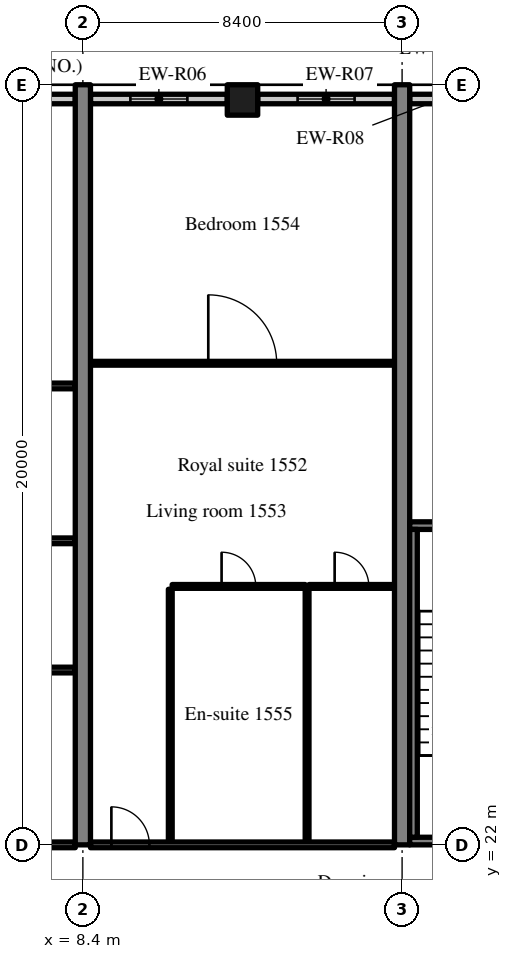
"""IFC4 building model, lengths in metres.
Left out: names, types, materials, properties, quantities, classifications, styles, units other than length and angle.
Written with IfcOpenShell. Run it as: python <this file> out.ifc"""

import sys

from ifc_helpers import new_model, si_unit, direction, frame, frame_2d, origin, origin_2d, place, context, subcontext, project, spatial, rectangle, extrude, source, transform, mapped, element, fill, save


model = new_model("IFC4")
c1 = context("Model", 3, precision=1e-05, world=origin(), true_north=direction((0.0, 1.0)))
c2 = subcontext(c1, "Body", "Model", "MODEL_VIEW")
j1 = project(units=[si_unit("LENGTHUNIT", "METRE"), si_unit("PLANEANGLEUNIT", "RADIAN")], contexts=[c1])
p1 = place(None, origin())
s1 = spatial("IfcSite", under=j1, at=p1, CompositionType="ELEMENT")
p2 = place(p1, origin())
s2 = spatial("IfcBuilding", under=s1, at=p2, CompositionType="ELEMENT")
p3 = place(p2, frame((0.0, 0.0, 65.8)))
s3 = spatial("IfcBuildingStorey", under=s2, at=p3, CompositionType="ELEMENT", Elevation=65.8)
m1 = source(origin(), c2, "Body", "SweptSolid", [
    extrude(rectangle(XDim=20.0, YDim=0.4, at=frame_2d((10.0, 0.0))), origin(), (0.0, 0.0, 1.0), 3.52),
])
for number, where, z_axis, x_axis in (
    (1, (8.4, 22.0, 0.0), (0.0, 0.0, 1.0), (0.0, 1.0, 0.0)),
    (2, (16.8, 22.0, 0.0), (0.0, 0.0, 1.0), (0.0, 1.0, 0.0)),
):
    element("IfcWall", number, at=place(p3, frame(where, z_axis=z_axis, x_axis=x_axis)), inside=s3, PredefinedType="SHEAR", context=c2, shape_type="MappedRepresentation", body=[
        mapped(m1, transform((0.0, 0.0, 0.0), scale=1.0)),
    ])
m2 = source(origin(), c2, "Body", "SweptSolid", [
    extrude(rectangle(XDim=0.8, YDim=0.8, at=origin_2d()), origin(), (0.0, 0.0, 1.0), 3.52),
])
p4 = place(p3, frame((12.6, 41.6, 0.0), z_axis=(0.0, 0.0, 1.0), x_axis=(1.0, 0.0, 0.0)))
e3 = element("IfcColumn", 3, at=p4, inside=s3, PredefinedType="COLUMN", context=c2, shape_type="MappedRepresentation", body=[
    mapped(m2, transform((0.0, 0.0, 0.0), scale=1.0)),
])
m3 = source(origin(), c2, "Body", "SweptSolid", [
    extrude(rectangle(XDim=4.045, YDim=0.25, at=frame_2d((2.022, 0.0))), origin(), (0.0, 0.0, 1.0), 2.82),
])
p5 = place(p3, frame((8.2, 41.625, 0.0), z_axis=(0.0, 0.0, 1.0), x_axis=(-1.0, 0.0, 0.0)))
e4 = element("IfcWall", 4, at=p5, inside=s3, PredefinedType="SOLIDWALL", context=c2, shape_type="MappedRepresentation", body=[
    mapped(m3, transform((0.0, 0.0, 0.0), scale=1.0)),
])
m4 = source(origin(), c2, "Body", "SweptSolid", [
    extrude(rectangle(XDim=1.5, YDim=1.5, at=frame_2d((0.75, 0.75))), frame((0.0, 0.135, 0.0), z_axis=(0.0, -1.0, 0.0), x_axis=(1.0, 0.0, 0.0)), (0.0, 0.0, 1.0), 0.27),
])
p6 = place(p5, frame((1.272, 0.0, 0.9)))
e5 = element("IfcOpeningElement", 5, at=p6, cuts=e4, PredefinedType="OPENING", context=c2, shape_type="MappedRepresentation", body=[
    mapped(m4, transform((0.0, 0.0, 0.0), scale=1.0)),
])
m5 = source(origin(), c2, "Body", "SweptSolid", [
    extrude(rectangle(XDim=3.6, YDim=0.25, at=frame_2d((1.8, 0.0))), origin(), (0.0, 0.0, 1.0), 2.82),
])
p7 = place(p3, frame((12.2, 41.625, 0.0), z_axis=(0.0, 0.0, 1.0), x_axis=(-1.0, 0.0, 0.0)))
e6 = element("IfcWall", 6, at=p7, inside=s3, PredefinedType="SOLIDWALL", context=c2, shape_type="MappedRepresentation", body=[
    mapped(m5, transform((0.0, 0.0, 0.0), scale=1.0)),
])
p8 = place(p7, frame((1.05, 0.0, 0.9)))
e7 = element("IfcOpeningElement", 7, at=p8, cuts=e6, PredefinedType="OPENING", context=c2, shape_type="MappedRepresentation", body=[
    mapped(m4, transform((0.0, 0.0, 0.0), scale=1.0)),
])
m6 = source(origin(), c2, "Body", "SweptSolid", [
    extrude(rectangle(XDim=3.6, YDim=0.25, at=frame_2d((1.8, 0.0))), origin(), (0.0, 0.0, 1.0), 2.82),
])
p9 = place(p3, frame((16.6, 41.625, 0.0), z_axis=(0.0, 0.0, 1.0), x_axis=(-1.0, 0.0, 0.0)))
e8 = element("IfcWall", 8, at=p9, inside=s3, PredefinedType="SOLIDWALL", context=c2, shape_type="MappedRepresentation", body=[
    mapped(m6, transform((0.0, 0.0, 0.0), scale=1.0)),
])
p10 = place(p9, frame((1.05, 0.0, 0.9)))
e9 = element("IfcOpeningElement", 9, at=p10, cuts=e8, PredefinedType="OPENING", context=c2, shape_type="MappedRepresentation", body=[
    mapped(m4, transform((0.0, 0.0, 0.0), scale=1.0)),
])
m7 = source(origin(), c2, "Body", "SweptSolid", [
    extrude(rectangle(XDim=1.658, YDim=0.25, at=frame_2d((0.829, 0.0))), origin(), (0.0, 0.0, 1.0), 2.82),
])
p11 = place(p3, frame((18.658, 41.625, 0.0), z_axis=(0.0, 0.0, 1.0), x_axis=(-1.0, 0.0, 0.0)))
e10 = element("IfcWall", 10, at=p11, inside=s3, PredefinedType="SOLIDWALL", context=c2, shape_type="MappedRepresentation", body=[
    mapped(m7, transform((0.0, 0.0, 0.0), scale=1.0)),
])
m8 = source(origin(), c2, "Body", "SweptSolid", [
    extrude(rectangle(XDim=8.2, YDim=0.2, at=frame_2d((4.1, 0.0))), origin(), (0.0, 0.0, 1.0), 3.52),
])
p12 = place(p3, frame((17.0, 22.1, 0.0), z_axis=(0.0, 0.0, 1.0), x_axis=(1.0, 0.0, 0.0)))
e11 = element("IfcWall", 11, at=p12, inside=s3, PredefinedType="SOLIDWALL", context=c2, shape_type="MappedRepresentation", body=[
    mapped(m8, transform((0.0, 0.0, 0.0), scale=1.0)),
])
m9 = source(origin(), c2, "Body", "SweptSolid", [
    extrude(rectangle(XDim=1.2, YDim=2.1, at=frame_2d((0.6, 1.05))), frame((0.0, 0.11, 0.0), z_axis=(0.0, -1.0, 0.0), x_axis=(1.0, 0.0, 0.0)), (0.0, 0.0, 1.0), 0.22),
])
p13 = place(p12, frame((6.0, 0.0, 0.0)))
e12 = element("IfcOpeningElement", 12, at=p13, cuts=e11, PredefinedType="OPENING", context=c2, shape_type="MappedRepresentation", body=[
    mapped(m9, transform((0.0, 0.0, 0.0), scale=1.0)),
])
p14 = place(p3, frame((17.0, 30.4, 0.0), z_axis=(0.0, 0.0, 1.0), x_axis=(1.0, 0.0, 0.0)))
e13 = element("IfcWall", 13, at=p14, inside=s3, PredefinedType="SOLIDWALL", context=c2, shape_type="MappedRepresentation", body=[
    mapped(m8, transform((0.0, 0.0, 0.0), scale=1.0)),
])
m10 = source(origin(), c2, "Body", "SweptSolid", [
    extrude(rectangle(XDim=1.0, YDim=2.1, at=frame_2d((0.5, 1.05))), frame((0.0, 0.11, 0.0), z_axis=(0.0, -1.0, 0.0), x_axis=(1.0, 0.0, 0.0)), (0.0, 0.0, 1.0), 0.22),
])
p15 = place(p14, frame((6.1, 0.0, 0.0)))
e14 = element("IfcOpeningElement", 14, at=p15, cuts=e13, PredefinedType="OPENING", context=c2, shape_type="MappedRepresentation", body=[
    mapped(m10, transform((0.0, 0.0, 0.0), scale=1.0)),
])
m11 = source(origin(), c2, "Body", "SweptSolid", [
    extrude(rectangle(XDim=8.1, YDim=0.2, at=frame_2d((4.05, 0.0))), origin(), (0.0, 0.0, 1.0), 3.52),
])
p16 = place(p3, frame((17.1, 22.2, 0.0), z_axis=(0.0, 0.0, 1.0), x_axis=(0.0, 1.0, 0.0)))
e15 = element("IfcWall", 15, at=p16, inside=s3, PredefinedType="SOLIDWALL", context=c2, shape_type="MappedRepresentation", body=[
    mapped(m11, transform((0.0, 0.0, 0.0), scale=1.0)),
])
m12 = source(origin(), c2, "Body", "SweptSolid", [
    extrude(rectangle(XDim=5.25, YDim=0.15, at=frame_2d((2.625, 0.0))), origin(), (0.0, 0.0, 1.0), 2.82),
])
p17 = place(p3, frame((2.95, 22.0, 0.0), z_axis=(0.0, 0.0, 1.0), x_axis=(1.0, 0.0, 0.0)))
e16 = element("IfcWall", 16, at=p17, inside=s3, PredefinedType="PARTITIONING", context=c2, shape_type="MappedRepresentation", body=[
    mapped(m12, transform((0.0, 0.0, 0.0), scale=1.0)),
])
m13 = source(origin(), c2, "Body", "SweptSolid", [
    extrude(rectangle(XDim=5.25, YDim=0.15, at=frame_2d((2.625, 0.0))), origin(), (0.0, 0.0, 1.0), 3.52),
])
for number, where, z_axis, x_axis in (
    (17, (2.95, 26.6, 0.0), (0.0, 0.0, 1.0), (1.0, 0.0, 0.0)),
    (18, (2.95, 30.0, 0.0), (0.0, 0.0, 1.0), (1.0, 0.0, 0.0)),
):
    element("IfcWall", number, at=place(p3, frame(where, z_axis=z_axis, x_axis=x_axis)), inside=s3, PredefinedType="PARTITIONING", context=c2, shape_type="MappedRepresentation", body=[
        mapped(m13, transform((0.0, 0.0, 0.0), scale=1.0)),
    ])
m14 = source(origin(), c2, "Body", "SweptSolid", [
    extrude(rectangle(XDim=7.8, YDim=0.15, at=frame_2d((3.9, 0.0))), origin(), (0.0, 0.0, 1.0), 3.52),
])
p18 = place(p3, frame((0.4, 34.075, 0.0), z_axis=(0.0, 0.0, 1.0), x_axis=(1.0, 0.0, 0.0)))
e19 = element("IfcWall", 19, at=p18, inside=s3, PredefinedType="PARTITIONING", context=c2, shape_type="MappedRepresentation", body=[
    mapped(m14, transform((0.0, 0.0, 0.0), scale=1.0)),
])
m15 = source(origin(), c2, "Body", "SweptSolid", [
    extrude(rectangle(XDim=1.0, YDim=2.1, at=frame_2d((0.5, 1.05))), frame((0.0, 0.085, 0.0), z_axis=(0.0, -1.0, 0.0), x_axis=(1.0, 0.0, 0.0)), (0.0, 0.0, 1.0), 0.17),
])
p19 = place(p18, frame((0.7, 0.0, 0.0)))
e20 = element("IfcOpeningElement", 20, at=p19, cuts=e19, PredefinedType="OPENING", context=c2, shape_type="MappedRepresentation", body=[
    mapped(m15, transform((0.0, 0.0, 0.0), scale=1.0)),
])
m16 = source(origin(), c2, "Body", "SweptSolid", [
    extrude(rectangle(XDim=6.65, YDim=0.1, at=frame_2d((3.325, 0.0))), origin(), (0.0, 0.0, 1.0), 3.52),
])
for number, where, z_axis, x_axis in (
    (21, (10.7, 22.075, 0.0), (0.0, 0.0, 1.0), (0.0, 1.0, 0.0)),
    (22, (14.3, 22.075, 0.0), (0.0, 0.0, 1.0), (0.0, 1.0, 0.0)),
):
    element("IfcWall", number, at=place(p3, frame(where, z_axis=z_axis, x_axis=x_axis)), inside=s3, PredefinedType="PARTITIONING", context=c2, shape_type="MappedRepresentation", body=[
        mapped(m16, transform((0.0, 0.0, 0.0), scale=1.0)),
    ])
m17 = source(origin(), c2, "Body", "SweptSolid", [
    extrude(rectangle(XDim=3.5, YDim=0.1, at=frame_2d((1.75, 0.0))), origin(), (0.0, 0.0, 1.0), 3.52),
])
p20 = place(p3, frame((10.75, 28.8, 0.0), z_axis=(0.0, 0.0, 1.0), x_axis=(1.0, 0.0, 0.0)))
e23 = element("IfcWall", 23, at=p20, inside=s3, PredefinedType="PARTITIONING", context=c2, shape_type="MappedRepresentation", body=[
    mapped(m17, transform((0.0, 0.0, 0.0), scale=1.0)),
])
m18 = source(origin(), c2, "Body", "SweptSolid", [
    extrude(rectangle(XDim=0.9, YDim=2.1, at=frame_2d((0.45, 1.05))), frame((0.0, 0.06, 0.0), z_axis=(0.0, -1.0, 0.0), x_axis=(1.0, 0.0, 0.0)), (0.0, 0.0, 1.0), 0.12),
])
p21 = place(p20, frame((1.3, 0.0, 0.0)))
e24 = element("IfcOpeningElement", 24, at=p21, cuts=e23, PredefinedType="OPENING", context=c2, shape_type="MappedRepresentation", body=[
    mapped(m18, transform((0.0, 0.0, 0.0), scale=1.0)),
])
m19 = source(origin(), c2, "Body", "SweptSolid", [
    extrude(rectangle(XDim=2.25, YDim=0.1, at=frame_2d((1.125, 0.0))), origin(), (0.0, 0.0, 1.0), 3.52),
])
p22 = place(p3, frame((14.35, 28.8, 0.0), z_axis=(0.0, 0.0, 1.0), x_axis=(1.0, 0.0, 0.0)))
e25 = element("IfcWall", 25, at=p22, inside=s3, PredefinedType="PARTITIONING", context=c2, shape_type="MappedRepresentation", body=[
    mapped(m19, transform((0.0, 0.0, 0.0), scale=1.0)),
])
p23 = place(p22, frame((0.675, 0.0, 0.0)))
e26 = element("IfcOpeningElement", 26, at=p23, cuts=e25, PredefinedType="OPENING", context=c2, shape_type="MappedRepresentation", body=[
    mapped(m18, transform((0.0, 0.0, 0.0), scale=1.0)),
])
m20 = source(origin(), c2, "Body", "SweptSolid", [
    extrude(rectangle(XDim=8.0, YDim=0.1, at=frame_2d((4.0, 0.0))), origin(), (0.0, 0.0, 1.0), 3.52),
])
p24 = place(p3, frame((8.6, 34.672, 0.0), z_axis=(0.0, 0.0, 1.0), x_axis=(1.0, 0.0, 0.0)))
e27 = element("IfcWall", 27, at=p24, inside=s3, PredefinedType="PARTITIONING", context=c2, shape_type="MappedRepresentation", body=[
    mapped(m20, transform((0.0, 0.0, 0.0), scale=1.0)),
])
m21 = source(origin(), c2, "Body", "SweptSolid", [
    extrude(rectangle(XDim=1.8, YDim=2.1, at=frame_2d((0.9, 1.05))), frame((0.0, 0.06, 0.0), z_axis=(0.0, -1.0, 0.0), x_axis=(1.0, 0.0, 0.0)), (0.0, 0.0, 1.0), 0.12),
])
p25 = place(p24, frame((3.1, 0.0, 0.0)))
e28 = element("IfcOpeningElement", 28, at=p25, cuts=e27, PredefinedType="OPENING", context=c2, shape_type="MappedRepresentation", body=[
    mapped(m21, transform((0.0, 0.0, 0.0), scale=1.0)),
])
m22 = source(origin(), c2, "Body", "SweptSolid", [
    extrude(rectangle(XDim=8.0, YDim=0.15, at=frame_2d((4.0, 0.0))), origin(), (0.0, 0.0, 1.0), 2.82),
])
p26 = place(p3, frame((8.6, 22.0, 0.0), z_axis=(0.0, 0.0, 1.0), x_axis=(1.0, 0.0, 0.0)))
e29 = element("IfcWall", 29, at=p26, inside=s3, PredefinedType="PARTITIONING", context=c2, shape_type="MappedRepresentation", body=[
    mapped(m22, transform((0.0, 0.0, 0.0), scale=1.0)),
])
p27 = place(p26, frame((0.55, 0.0, 0.0)))
e30 = element("IfcOpeningElement", 30, at=p27, cuts=e29, PredefinedType="OPENING", context=c2, shape_type="MappedRepresentation", body=[
    mapped(m15, transform((0.0, 0.0, 0.0), scale=1.0)),
])
m23 = source(origin(), c2, "Body", "SweptSolid", [
    extrude(rectangle(XDim=1.5, YDim=1.5, at=frame_2d((0.75, 0.75))), frame((0.0, 0.03, 0.0), z_axis=(0.0, -1.0, 0.0), x_axis=(1.0, 0.0, 0.0)), (0.0, 0.0, 1.0), 0.06),
])
p28 = place(p8, origin())
e31 = element("IfcWindow", 31, at=p28, inside=s3, PartitioningType="SINGLE_PANEL", PredefinedType="WINDOW", context=c2, shape_type="MappedRepresentation", body=[
    mapped(m23, transform((0.0, 0.0, 0.0), scale=1.0)),
])
fill(e7, e31)
p29 = place(p10, origin())
e32 = element("IfcWindow", 32, at=p29, inside=s3, PartitioningType="SINGLE_PANEL", PredefinedType="WINDOW", context=c2, shape_type="MappedRepresentation", body=[
    mapped(m23, transform((0.0, 0.0, 0.0), scale=1.0)),
])
fill(e9, e32)
m24 = source(origin(), c2, "Body", "SweptSolid", [
    extrude(rectangle(XDim=0.9, YDim=2.1, at=frame_2d((0.45, 1.05))), frame((0.0, 0.025, 0.0), z_axis=(0.0, -1.0, 0.0), x_axis=(1.0, 0.0, 0.0)), (0.0, 0.0, 1.0), 0.05),
])
p30 = place(p21, origin())
e33 = element("IfcDoor", 33, at=p30, inside=s3, OperationType="SINGLE_SWING_LEFT", PredefinedType="DOOR", context=c2, shape_type="MappedRepresentation", body=[
    mapped(m24, transform((0.0, 0.0, 0.0), scale=1.0)),
])
fill(e24, e33)
p31 = place(p23, origin())
e34 = element("IfcDoor", 34, at=p31, inside=s3, OperationType="SINGLE_SWING_LEFT", PredefinedType="DOOR", context=c2, shape_type="MappedRepresentation", body=[
    mapped(m24, transform((0.0, 0.0, 0.0), scale=1.0)),
])
fill(e26, e34)
m25 = source(origin(), c2, "Body", "SweptSolid", [
    extrude(rectangle(XDim=1.8, YDim=2.1, at=frame_2d((0.9, 1.05))), frame((0.0, 0.025, 0.0), z_axis=(0.0, -1.0, 0.0), x_axis=(1.0, 0.0, 0.0)), (0.0, 0.0, 1.0), 0.05),
])
p32 = place(p25, origin())
e35 = element("IfcDoor", 35, at=p32, inside=s3, OperationType="DOUBLE_DOOR_SINGLE_SWING", PredefinedType="DOOR", context=c2, shape_type="MappedRepresentation", body=[
    mapped(m25, transform((0.0, 0.0, 0.0), scale=1.0)),
])
fill(e28, e35)
m26 = source(origin(), c2, "Body", "SweptSolid", [
    extrude(rectangle(XDim=1.0, YDim=2.1, at=frame_2d((0.5, 1.05))), frame((0.0, 0.025, 0.0), z_axis=(0.0, -1.0, 0.0), x_axis=(1.0, 0.0, 0.0)), (0.0, 0.0, 1.0), 0.05),
])
p33 = place(p27, origin())
e36 = element("IfcDoor", 36, at=p33, inside=s3, OperationType="SINGLE_SWING_LEFT", PredefinedType="DOOR", context=c2, shape_type="MappedRepresentation", body=[
    mapped(m26, transform((0.0, 0.0, 0.0), scale=1.0)),
])
fill(e30, e36)
save(model, sys.argv[1])
